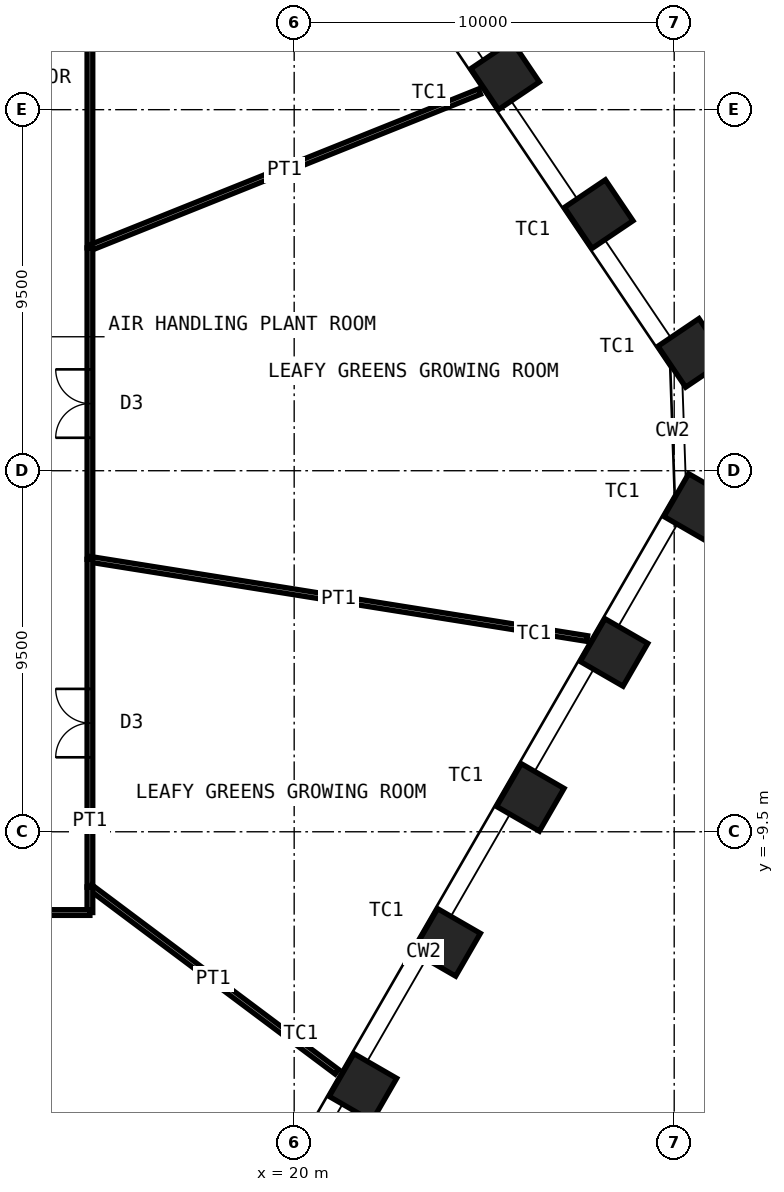
"""IFC4 building model, lengths in metres.
Left out: names, types, materials, properties, quantities, classifications, styles, units other than length and angle.
Written with IfcOpenShell. Run it as: python <this file> out.ifc"""

import sys

from ifc_helpers import new_model, si_unit, direction, frame, frame_2d, origin, origin_2d, place, context, subcontext, project, spatial, rectangle, hollow_rectangle, extrude, element, fill, save


model = new_model("IFC4")
c1 = context("Model", 3, precision=1e-05, world=origin(), true_north=direction((0.0, 1.0)))
c2 = subcontext(c1, "Body", "Model", "MODEL_VIEW")
j1 = project(units=[si_unit("LENGTHUNIT", "METRE"), si_unit("PLANEANGLEUNIT", "RADIAN")], contexts=[c1])
p1 = place(None, origin())
s1 = spatial("IfcSite", under=j1, at=p1, CompositionType="ELEMENT")
p2 = place(p1, origin())
s2 = spatial("IfcBuilding", under=s1, at=p2, CompositionType="ELEMENT")
p3 = place(p2, frame((0.0, 0.0, 42.0)))
s3 = spatial("IfcBuildingStorey", under=s2, at=p3, CompositionType="ELEMENT", Elevation=42.0)
for number, where, z_axis, x_axis in (
    (1, (25.55, 10.404, 0.0), (0.0, 0.0, 1.0), (-0.559, 0.829, 0.0)),
    (2, (28.013, 6.752, 0.0), (0.0, 0.0, 1.0), (-0.559, 0.829, 0.0)),
    (3, (30.476, 3.101, 0.0), (0.0, 0.0, 1.0), (-0.559, 0.829, 0.0)),
    (4, (30.618, -0.967, 0.0), (0.0, 0.0, 1.0), (0.5, 0.866, 0.0)),
    (5, (28.416, -4.782, 0.0), (0.0, 0.0, 1.0), (0.5, 0.866, 0.0)),
    (6, (26.214, -8.596, 0.0), (0.0, 0.0, 1.0), (0.5, 0.866, 0.0)),
    (7, (24.011, -12.411, 0.0), (0.0, 0.0, 1.0), (0.5, 0.866, 0.0)),
    (8, (21.809, -16.225, 0.0), (0.0, 0.0, 1.0), (0.5, 0.866, 0.0)),
):
    element("IfcColumn", number, at=place(p3, frame(where, z_axis=z_axis, x_axis=x_axis)), inside=s3, PredefinedType="COLUMN", context=c2, shape_type="SweptSolid", body=[
        extrude(hollow_rectangle(XDim=1.3, YDim=1.3, WallThickness=0.1, at=origin_2d()), origin(), (0.0, 0.0, 1.0), 5.0),
    ])
p4 = place(p3, frame((14.625, 11.625, 0.0), z_axis=(0.0, 0.0, 1.0), x_axis=(0.0, -1.0, 0.0)))
e9 = element("IfcWall", 9, at=p4, inside=s3, PredefinedType="PARTITIONING", context=c2, shape_type="SweptSolid", body=[
    extrude(rectangle(XDim=5.761, YDim=0.15, at=frame_2d((2.88, 0.0))), origin(), (0.0, 0.0, 1.0), 4.8),
])
p5 = place(p3, frame((24.877, 9.975, 0.0), z_axis=(0.0, 0.0, 1.0), x_axis=(-0.928157765849, -0.372186998288, 0.0)))
e10 = element("IfcWall", 10, at=p5, inside=s3, PredefinedType="PARTITIONING", context=c2, shape_type="SweptSolid", body=[
    extrude(rectangle(XDim=11.046, YDim=0.15, at=frame_2d((5.523, 0.0))), origin(), (0.0, 0.0, 1.0), 3.7),
])
p6 = place(p3, frame((14.625, 5.864, 0.0), z_axis=(0.0, 0.0, 1.0), x_axis=(0.0, -1.0, 0.0)))
e11 = element("IfcWall", 11, at=p6, inside=s3, PredefinedType="PARTITIONING", context=c2, shape_type="SweptSolid", body=[
    extrude(rectangle(XDim=8.195, YDim=0.15, at=frame_2d((4.097, 0.0))), origin(), (0.0, 0.0, 1.0), 4.8),
])
p7 = place(p6, frame((3.198, 0.0, 0.0)))
e12 = element("IfcOpeningElement", 12, at=p7, cuts=e11, PredefinedType="OPENING", context=c2, shape_type="SweptSolid", body=[
    extrude(rectangle(XDim=1.8, YDim=2.4, at=frame_2d((0.9, 1.2))), frame((0.0, 0.085, 0.0), z_axis=(0.0, -1.0, 0.0), x_axis=(1.0, 0.0, 0.0)), (0.0, 0.0, 1.0), 0.17),
])
p8 = place(p3, frame((27.711, -4.416, 0.0), z_axis=(0.0, 0.0, 1.0), x_axis=(-0.987538625309, 0.15737682016, 0.0)))
e13 = element("IfcWall", 13, at=p8, inside=s3, PredefinedType="PARTITIONING", context=c2, shape_type="SweptSolid", body=[
    extrude(rectangle(XDim=13.251, YDim=0.15, at=frame_2d((6.625, 0.0))), origin(), (0.0, 0.0, 1.0), 3.7),
])
p9 = place(p3, frame((14.625, -2.331, 0.0), z_axis=(0.0, 0.0, 1.0), x_axis=(0.0, -1.0, 0.0)))
e14 = element("IfcWall", 14, at=p9, inside=s3, PredefinedType="PARTITIONING", context=c2, shape_type="SweptSolid", body=[
    extrude(rectangle(XDim=8.62, YDim=0.15, at=frame_2d((4.31, 0.0))), origin(), (0.0, 0.0, 1.0), 4.8),
])
p10 = place(p9, frame((3.41, 0.0, 0.0)))
e15 = element("IfcOpeningElement", 15, at=p10, cuts=e14, PredefinedType="OPENING", context=c2, shape_type="SweptSolid", body=[
    extrude(rectangle(XDim=1.8, YDim=2.4, at=frame_2d((0.9, 1.2))), frame((0.0, 0.085, 0.0), z_axis=(0.0, -1.0, 0.0), x_axis=(1.0, 0.0, 0.0)), (0.0, 0.0, 1.0), 0.17),
])
p11 = place(p3, frame((21.123, -15.815, 0.0), z_axis=(0.0, 0.0, 1.0), x_axis=(-0.800490565123, 0.599345355492, 0.0)))
e16 = element("IfcWall", 16, at=p11, inside=s3, PredefinedType="PARTITIONING", context=c2, shape_type="SweptSolid", body=[
    extrude(rectangle(XDim=8.118, YDim=0.15, at=frame_2d((4.059, 0.0))), origin(), (0.0, 0.0, 1.0), 3.7),
])
p12 = place(p3, frame((14.625, -10.95, 0.0), z_axis=(0.0, 0.0, 1.0), x_axis=(0.0, -1.0, 0.0)))
e17 = element("IfcWall", 17, at=p12, inside=s3, PredefinedType="PARTITIONING", context=c2, shape_type="SweptSolid", body=[
    extrude(rectangle(XDim=0.675, YDim=0.15, at=frame_2d((0.337, 0.0))), origin(), (0.0, 0.0, 1.0), 4.8),
])
p13 = place(p3, frame((14.625, -11.625, 0.0), z_axis=(0.0, 0.0, 1.0), x_axis=(-1.0, 0.0, 0.0)))
e18 = element("IfcWall", 18, at=p13, inside=s3, PredefinedType="PARTITIONING", context=c2, shape_type="SweptSolid", body=[
    extrude(rectangle(XDim=16.29, YDim=0.15, at=frame_2d((8.145, 0.0))), origin(), (0.0, 0.0, 1.0), 4.8),
])
p14 = place(p13, frame((7.245, 0.0, 0.0)))
e19 = element("IfcOpeningElement", 19, at=p14, cuts=e18, PredefinedType="OPENING", context=c2, shape_type="SweptSolid", body=[
    extrude(rectangle(XDim=1.8, YDim=2.4, at=frame_2d((0.9, 1.2))), frame((0.0, 0.085, 0.0), z_axis=(0.0, -1.0, 0.0), x_axis=(1.0, 0.0, 0.0)), (0.0, 0.0, 1.0), 0.17),
])
p15 = place(p7, origin())
e20 = element("IfcDoor", 20, at=p15, inside=s3, OperationType="DOUBLE_DOOR_DOUBLE_SWING", PredefinedType="DOOR", context=c2, shape_type="SweptSolid", body=[
    extrude(rectangle(XDim=1.8, YDim=2.4, at=frame_2d((0.9, 1.2))), frame((0.0, 0.025, 0.0), z_axis=(0.0, -1.0, 0.0), x_axis=(1.0, 0.0, 0.0)), (0.0, 0.0, 1.0), 0.05),
])
fill(e12, e20)
p16 = place(p10, origin())
e21 = element("IfcDoor", 21, at=p16, inside=s3, OperationType="DOUBLE_DOOR_DOUBLE_SWING", PredefinedType="DOOR", context=c2, shape_type="SweptSolid", body=[
    extrude(rectangle(XDim=1.8, YDim=2.4, at=frame_2d((0.9, 1.2))), frame((0.0, 0.025, 0.0), z_axis=(0.0, -1.0, 0.0), x_axis=(1.0, 0.0, 0.0)), (0.0, 0.0, 1.0), 0.05),
])
fill(e15, e21)
save(model, sys.argv[1])
